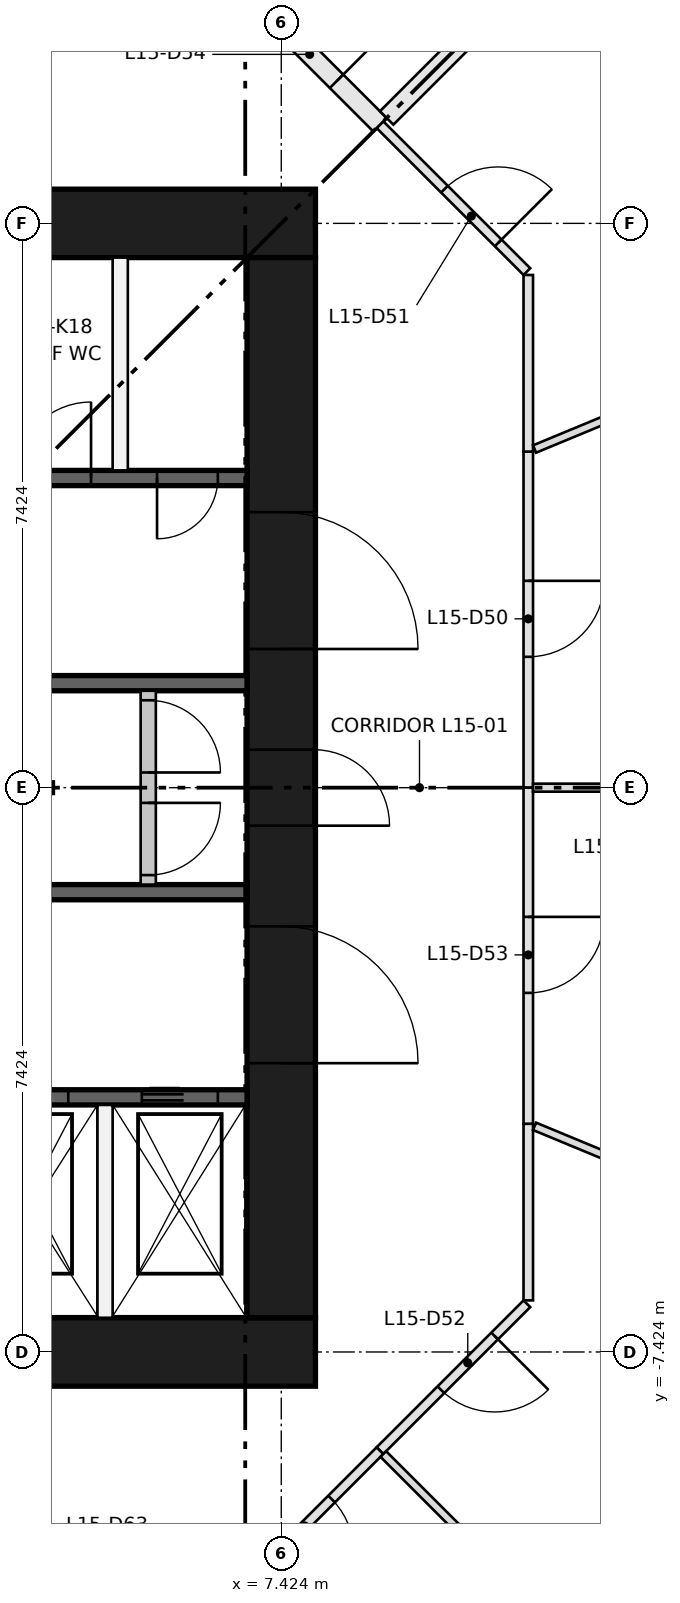
"""IFC4 building model, lengths in metres.
Left out: names, types, materials, properties, quantities, classifications, styles, units other than length and angle.
Written with IfcOpenShell. Run it as: python <this file> out.ifc"""

import sys

from ifc_helpers import new_model, si_unit, direction, frame, frame_2d, origin, place, context, subcontext, project, spatial, rectangle, extrude, element, fill, save


model = new_model("IFC4")
c1 = context("Model", 3, precision=1e-05, world=origin(), true_north=direction((0.0, 1.0)))
c2 = subcontext(c1, "Body", "Model", "MODEL_VIEW")
j1 = project(units=[si_unit("LENGTHUNIT", "METRE"), si_unit("PLANEANGLEUNIT", "RADIAN")], contexts=[c1])
p1 = place(None, origin())
s1 = spatial("IfcSite", under=j1, at=p1, CompositionType="ELEMENT")
p2 = place(p1, origin())
s2 = spatial("IfcBuilding", under=s1, at=p2, CompositionType="ELEMENT")
p3 = place(p2, frame((0.0, 0.0, 59.05)))
s3 = spatial("IfcBuildingStorey", under=s2, at=p3, CompositionType="ELEMENT", Elevation=59.05)
for number, where, z_axis, x_axis in (
    (1, (-7.874, -7.424, 0.0), (0.0, 0.0, 1.0), (1.0, 0.0, 0.0)),
    (2, (-7.874, 7.424, 0.0), (0.0, 0.0, 1.0), (1.0, 0.0, 0.0)),
):
    element("IfcWall", number, at=place(p3, frame(where, z_axis=z_axis, x_axis=x_axis)), inside=s3, PredefinedType="SHEAR", context=c2, shape_type="SweptSolid", body=[
        extrude(rectangle(XDim=15.748, YDim=0.9, at=frame_2d((7.874, 0.0))), origin(), (0.0, 0.0, 1.0), 3.65),
    ])
p4 = place(p3, frame((7.424, -6.974, 0.0), z_axis=(0.0, 0.0, 1.0), x_axis=(0.0, 1.0, 0.0)))
e3 = element("IfcWall", 3, at=p4, inside=s3, PredefinedType="SHEAR", context=c2, shape_type="SweptSolid", body=[
    extrude(rectangle(XDim=13.948, YDim=0.9, at=frame_2d((6.974, 0.0))), origin(), (0.0, 0.0, 1.0), 3.65),
])
p5 = place(p4, frame((6.474, 0.0, 0.0)))
e4 = element("IfcOpeningElement", 4, at=p5, cuts=e3, PredefinedType="OPENING", context=c2, shape_type="SweptSolid", body=[
    extrude(rectangle(XDim=1.0, YDim=2.1, at=frame_2d((0.5, 1.05))), frame((0.0, 0.46, 0.0), z_axis=(0.0, -1.0, 0.0), x_axis=(1.0, 0.0, 0.0)), (0.0, 0.0, 1.0), 0.92),
])
p6 = place(p4, frame((3.35, 0.0, 0.0)))
e5 = element("IfcOpeningElement", 5, at=p6, cuts=e3, PredefinedType="OPENING", context=c2, shape_type="SweptSolid", body=[
    extrude(rectangle(XDim=1.8, YDim=2.1, at=frame_2d((0.9, 1.05))), frame((0.0, 0.46, 0.0), z_axis=(0.0, -1.0, 0.0), x_axis=(1.0, 0.0, 0.0)), (0.0, 0.0, 1.0), 0.92),
])
p7 = place(p4, frame((8.799, 0.0, 0.0)))
e6 = element("IfcOpeningElement", 6, at=p7, cuts=e3, PredefinedType="OPENING", context=c2, shape_type="SweptSolid", body=[
    extrude(rectangle(XDim=1.8, YDim=2.1, at=frame_2d((0.9, 1.05))), frame((0.0, 0.46, 0.0), z_axis=(0.0, -1.0, 0.0), x_axis=(1.0, 0.0, 0.0)), (0.0, 0.0, 1.0), 0.92),
])
p8 = place(p3, frame((-6.974, -4.074, 0.0), z_axis=(0.0, 0.0, 1.0), x_axis=(1.0, 0.0, 0.0)))
e7 = element("IfcWall", 7, at=p8, inside=s3, PredefinedType="SHEAR", context=c2, shape_type="SweptSolid", body=[
    extrude(rectangle(XDim=13.948, YDim=0.2, at=frame_2d((6.974, 0.0))), origin(), (0.0, 0.0, 1.0), 3.3),
])
p9 = place(p8, frame((0.918, 0.0, 0.0)))
e8 = element("IfcOpeningElement", 8, at=p9, cuts=e7, PredefinedType="OPENING", context=c2, shape_type="SweptSolid", body=[
    extrude(rectangle(XDim=1.1, YDim=2.1, at=frame_2d((0.55, 1.05))), frame((0.0, 0.11, 0.0), z_axis=(0.0, -1.0, 0.0), x_axis=(1.0, 0.0, 0.0)), (0.0, 0.0, 1.0), 0.22),
])
p10 = place(p8, frame((4.055, 0.0, 0.0)))
e9 = element("IfcOpeningElement", 9, at=p10, cuts=e7, PredefinedType="OPENING", context=c2, shape_type="SweptSolid", body=[
    extrude(rectangle(XDim=1.1, YDim=2.1, at=frame_2d((0.55, 1.05))), frame((0.0, 0.11, 0.0), z_axis=(0.0, -1.0, 0.0), x_axis=(1.0, 0.0, 0.0)), (0.0, 0.0, 1.0), 0.22),
])
p11 = place(p8, frame((6.658, 0.0, 0.0)))
e10 = element("IfcOpeningElement", 10, at=p11, cuts=e7, PredefinedType="OPENING", context=c2, shape_type="SweptSolid", body=[
    extrude(rectangle(XDim=1.0, YDim=2.1, at=frame_2d((0.5, 1.05))), frame((0.0, 0.11, 0.0), z_axis=(0.0, -1.0, 0.0), x_axis=(1.0, 0.0, 0.0)), (0.0, 0.0, 1.0), 0.22),
])
p12 = place(p8, frame((8.627, 0.0, 0.0)))
e11 = element("IfcOpeningElement", 11, at=p12, cuts=e7, PredefinedType="OPENING", context=c2, shape_type="SweptSolid", body=[
    extrude(rectangle(XDim=1.0, YDim=2.1, at=frame_2d((0.5, 1.05))), frame((0.0, 0.11, 0.0), z_axis=(0.0, -1.0, 0.0), x_axis=(1.0, 0.0, 0.0)), (0.0, 0.0, 1.0), 0.22),
])
p13 = place(p8, frame((10.595, 0.0, 0.0)))
e12 = element("IfcOpeningElement", 12, at=p13, cuts=e7, PredefinedType="OPENING", context=c2, shape_type="SweptSolid", body=[
    extrude(rectangle(XDim=1.0, YDim=2.1, at=frame_2d((0.5, 1.05))), frame((0.0, 0.11, 0.0), z_axis=(0.0, -1.0, 0.0), x_axis=(1.0, 0.0, 0.0)), (0.0, 0.0, 1.0), 0.22),
])
p14 = place(p8, frame((12.564, 0.0, 0.0)))
e13 = element("IfcOpeningElement", 13, at=p14, cuts=e7, PredefinedType="OPENING", context=c2, shape_type="SweptSolid", body=[
    extrude(rectangle(XDim=1.0, YDim=2.1, at=frame_2d((0.5, 1.05))), frame((0.0, 0.11, 0.0), z_axis=(0.0, -1.0, 0.0), x_axis=(1.0, 0.0, 0.0)), (0.0, 0.0, 1.0), 0.22),
])
p15 = place(p3, frame((0.0, 4.074, 0.0), z_axis=(0.0, 0.0, 1.0), x_axis=(1.0, 0.0, 0.0)))
e14 = element("IfcWall", 14, at=p15, inside=s3, PredefinedType="SHEAR", context=c2, shape_type="SweptSolid", body=[
    extrude(rectangle(XDim=6.974, YDim=0.2, at=frame_2d((3.487, 0.0))), origin(), (0.0, 0.0, 1.0), 3.3),
])
p16 = place(p15, frame((0.179, 0.0, 0.0)))
e15 = element("IfcOpeningElement", 15, at=p16, cuts=e14, PredefinedType="OPENING", context=c2, shape_type="SweptSolid", body=[
    extrude(rectangle(XDim=0.95, YDim=2.1, at=frame_2d((0.475, 1.05))), frame((0.0, 0.11, 0.0), z_axis=(0.0, -1.0, 0.0), x_axis=(1.0, 0.0, 0.0)), (0.0, 0.0, 1.0), 0.22),
])
p17 = place(p15, frame((1.922, 0.0, 0.0)))
e16 = element("IfcOpeningElement", 16, at=p17, cuts=e14, PredefinedType="OPENING", context=c2, shape_type="SweptSolid", body=[
    extrude(rectangle(XDim=1.0, YDim=2.1, at=frame_2d((0.5, 1.05))), frame((0.0, 0.11, 0.0), z_axis=(0.0, -1.0, 0.0), x_axis=(1.0, 0.0, 0.0)), (0.0, 0.0, 1.0), 0.22),
])
p18 = place(p15, frame((3.921, 0.0, 0.0)))
e17 = element("IfcOpeningElement", 17, at=p18, cuts=e14, PredefinedType="OPENING", context=c2, shape_type="SweptSolid", body=[
    extrude(rectangle(XDim=1.0, YDim=2.1, at=frame_2d((0.5, 1.05))), frame((0.0, 0.11, 0.0), z_axis=(0.0, -1.0, 0.0), x_axis=(1.0, 0.0, 0.0)), (0.0, 0.0, 1.0), 0.22),
])
p19 = place(p15, frame((5.79, 0.0, 0.0)))
e18 = element("IfcOpeningElement", 18, at=p19, cuts=e14, PredefinedType="OPENING", context=c2, shape_type="SweptSolid", body=[
    extrude(rectangle(XDim=0.8, YDim=2.1, at=frame_2d((0.4, 1.05))), frame((0.0, 0.11, 0.0), z_axis=(0.0, -1.0, 0.0), x_axis=(1.0, 0.0, 0.0)), (0.0, 0.0, 1.0), 0.22),
])
for number, where, z_axis, x_axis in (
    (19, (4.374, -1.375, 0.0), (0.0, 0.0, 1.0), (1.0, 0.0, 0.0)),
    (20, (4.374, 1.375, 0.0), (0.0, 0.0, 1.0), (1.0, 0.0, 0.0)),
):
    element("IfcWall", number, at=place(p3, frame(where, z_axis=z_axis, x_axis=x_axis)), inside=s3, PredefinedType="SHEAR", context=c2, shape_type="SweptSolid", body=[
        extrude(rectangle(XDim=2.6, YDim=0.2, at=frame_2d((1.3, 0.0))), origin(), (0.0, 0.0, 1.0), 3.3),
    ])
for number, where, z_axis, x_axis in (
    (21, (5.105, -6.974, 0.0), (0.0, 0.0, 1.0), (0.0, 1.0, 0.0)),
    (22, (5.305, 4.174, 0.0), (0.0, 0.0, 1.0), (0.0, 1.0, 0.0)),
):
    element("IfcWall", number, at=place(p3, frame(where, z_axis=z_axis, x_axis=x_axis)), inside=s3, PredefinedType="PARTITIONING", context=c2, shape_type="SweptSolid", body=[
        extrude(rectangle(XDim=2.8, YDim=0.2, at=frame_2d((1.4, 0.0))), origin(), (0.0, 0.0, 1.0), 3.3),
    ])
p20 = place(p3, frame((5.674, -1.275, 0.0), z_axis=(0.0, 0.0, 1.0), x_axis=(0.0, 1.0, 0.0)))
e23 = element("IfcWall", 23, at=p20, inside=s3, PredefinedType="PARTITIONING", context=c2, shape_type="SweptSolid", body=[
    extrude(rectangle(XDim=2.55, YDim=0.2, at=frame_2d((1.275, 0.0))), origin(), (0.0, 0.0, 1.0), 3.3),
])
p21 = place(p20, frame((0.125, 0.0, 0.0)))
e24 = element("IfcOpeningElement", 24, at=p21, cuts=e23, PredefinedType="OPENING", context=c2, shape_type="SweptSolid", body=[
    extrude(rectangle(XDim=0.95, YDim=2.1, at=frame_2d((0.475, 1.05))), frame((0.0, 0.11, 0.0), z_axis=(0.0, -1.0, 0.0), x_axis=(1.0, 0.0, 0.0)), (0.0, 0.0, 1.0), 0.22),
])
p22 = place(p20, frame((1.475, 0.0, 0.0)))
e25 = element("IfcOpeningElement", 25, at=p22, cuts=e23, PredefinedType="OPENING", context=c2, shape_type="SweptSolid", body=[
    extrude(rectangle(XDim=0.95, YDim=2.1, at=frame_2d((0.475, 1.05))), frame((0.0, 0.11, 0.0), z_axis=(0.0, -1.0, 0.0), x_axis=(1.0, 0.0, 0.0)), (0.0, 0.0, 1.0), 0.22),
])
p23 = place(p3, frame((10.674, 4.421, 0.0), z_axis=(0.0, 0.0, 1.0), x_axis=(0.0, -1.0, 0.0)))
e26 = element("IfcWall", 26, at=p23, inside=s3, PredefinedType="PARTITIONING", context=c2, shape_type="SweptSolid", body=[
    extrude(rectangle(XDim=4.421, YDim=0.125, at=frame_2d((2.211, 0.0))), origin(), (0.0, 0.0, 1.0), 3.3),
])
p24 = place(p23, frame((1.7, 0.0, 0.0)))
e27 = element("IfcOpeningElement", 27, at=p24, cuts=e26, PredefinedType="OPENING", context=c2, shape_type="SweptSolid", body=[
    extrude(rectangle(XDim=1.0, YDim=2.1, at=frame_2d((0.5, 1.05))), frame((0.0, 0.073, 0.0), z_axis=(0.0, -1.0, 0.0), x_axis=(1.0, 0.0, 0.0)), (0.0, 0.0, 1.0), 0.145),
])
p25 = place(p3, frame((8.722, 8.722, 0.0), z_axis=(0.0, 0.0, 1.0), x_axis=(0.707151428813, -0.707062130741, 0.0)))
e28 = element("IfcWall", 28, at=p25, inside=s3, PredefinedType="PARTITIONING", context=c2, shape_type="SweptSolid", body=[
    extrude(rectangle(XDim=2.734, YDim=0.125, at=frame_2d((1.367, 0.0))), origin(), (0.0, 0.0, 1.0), 3.3),
])
p26 = place(p25, frame((1.2, 0.0, 0.0)))
e29 = element("IfcOpeningElement", 29, at=p26, cuts=e28, PredefinedType="OPENING", context=c2, shape_type="SweptSolid", body=[
    extrude(rectangle(XDim=1.0, YDim=2.1, at=frame_2d((0.5, 1.05))), frame((0.0, 0.073, 0.0), z_axis=(0.0, -1.0, 0.0), x_axis=(1.0, 0.0, 0.0)), (0.0, 0.0, 1.0), 0.145),
])
p27 = place(p3, frame((10.674, 6.745, 0.0), z_axis=(0.0, 0.0, 1.0), x_axis=(0.0, -1.0, 0.0)))
e30 = element("IfcWall", 30, at=p27, inside=s3, PredefinedType="PARTITIONING", context=c2, shape_type="SweptSolid", body=[
    extrude(rectangle(XDim=2.324, YDim=0.125, at=frame_2d((1.162, 0.0))), origin(), (0.0, 0.0, 1.0), 3.3),
])
p28 = place(p3, frame((10.656, -6.789, 0.0), z_axis=(0.0, 0.0, 1.0), x_axis=(-0.707151428813, -0.707062130741, 0.0)))
e31 = element("IfcWall", 31, at=p28, inside=s3, PredefinedType="PARTITIONING", context=c2, shape_type="SweptSolid", body=[
    extrude(rectangle(XDim=2.734, YDim=0.125, at=frame_2d((1.367, 0.0))), origin(), (0.0, 0.0, 1.0), 3.3),
])
p29 = place(p28, frame((0.6, 0.0, 0.0)))
e32 = element("IfcOpeningElement", 32, at=p29, cuts=e31, PredefinedType="OPENING", context=c2, shape_type="SweptSolid", body=[
    extrude(rectangle(XDim=1.0, YDim=2.1, at=frame_2d((0.5, 1.05))), frame((0.0, 0.073, 0.0), z_axis=(0.0, -1.0, 0.0), x_axis=(1.0, 0.0, 0.0)), (0.0, 0.0, 1.0), 0.145),
])
p30 = place(p3, frame((10.674, -4.421, 0.0), z_axis=(0.0, 0.0, 1.0), x_axis=(0.0, -1.0, 0.0)))
e33 = element("IfcWall", 33, at=p30, inside=s3, PredefinedType="PARTITIONING", context=c2, shape_type="SweptSolid", body=[
    extrude(rectangle(XDim=2.324, YDim=0.125, at=frame_2d((1.162, 0.0))), origin(), (0.0, 0.0, 1.0), 3.3),
])
p31 = place(p3, frame((10.674, 0.0, 0.0), z_axis=(0.0, 0.0, 1.0), x_axis=(0.0, -1.0, 0.0)))
e34 = element("IfcWall", 34, at=p31, inside=s3, PredefinedType="PARTITIONING", context=c2, shape_type="SweptSolid", body=[
    extrude(rectangle(XDim=4.421, YDim=0.125, at=frame_2d((2.211, 0.0))), origin(), (0.0, 0.0, 1.0), 3.3),
])
p32 = place(p31, frame((1.7, 0.0, 0.0)))
e35 = element("IfcOpeningElement", 35, at=p32, cuts=e34, PredefinedType="OPENING", context=c2, shape_type="SweptSolid", body=[
    extrude(rectangle(XDim=1.0, YDim=2.1, at=frame_2d((0.5, 1.05))), frame((0.0, 0.073, 0.0), z_axis=(0.0, -1.0, 0.0), x_axis=(1.0, 0.0, 0.0)), (0.0, 0.0, 1.0), 0.145),
])
p33 = place(p3, frame((6.808, 10.637, 0.0), z_axis=(0.0, 0.0, 1.0), x_axis=(0.707061703777, -0.707151855722, 0.0)))
e36 = element("IfcWall", 36, at=p33, inside=s3, PredefinedType="PARTITIONING", context=c2, shape_type="SweptSolid", body=[
    extrude(rectangle(XDim=2.708, YDim=0.25, at=frame_2d((1.354, 0.0))), origin(), (0.0, 0.0, 1.0), 3.3),
])
p34 = place(p33, frame((0.9, 0.0, 0.0)))
e37 = element("IfcOpeningElement", 37, at=p34, cuts=e36, PredefinedType="OPENING", context=c2, shape_type="SweptSolid", body=[
    extrude(rectangle(XDim=1.0, YDim=2.1, at=frame_2d((0.5, 1.05))), frame((0.0, 0.135, 0.0), z_axis=(0.0, -1.0, 0.0), x_axis=(1.0, 0.0, 0.0)), (0.0, 0.0, 1.0), 0.27),
])
p35 = place(p3, frame((8.722, -8.722, 0.0), z_axis=(0.0, 0.0, 1.0), x_axis=(-0.707062130741, -0.707151428813, 0.0)))
e38 = element("IfcWall", 38, at=p35, inside=s3, PredefinedType="PARTITIONING", context=c2, shape_type="SweptSolid", body=[
    extrude(rectangle(XDim=2.734, YDim=0.125, at=frame_2d((1.367, 0.0))), origin(), (0.0, 0.0, 1.0), 3.3),
])
p36 = place(p35, frame((0.9, 0.0, 0.0)))
e39 = element("IfcOpeningElement", 39, at=p36, cuts=e38, PredefinedType="OPENING", context=c2, shape_type="SweptSolid", body=[
    extrude(rectangle(XDim=1.0, YDim=2.1, at=frame_2d((0.5, 1.05))), frame((0.0, 0.073, 0.0), z_axis=(0.0, -1.0, 0.0), x_axis=(1.0, 0.0, 0.0)), (0.0, 0.0, 1.0), 0.145),
])
p37 = place(p3, frame((10.757, 4.456, 0.0), z_axis=(0.0, 0.0, 1.0), x_axis=(0.923886131731, 0.382667500051, 0.0)))
e40 = element("IfcWall", 40, at=p37, inside=s3, PredefinedType="PARTITIONING", context=c2, shape_type="SweptSolid", body=[
    extrude(rectangle(XDim=3.597, YDim=0.105, at=frame_2d((1.798, 0.0))), origin(), (0.0, 0.0, 1.0), 3.3),
])
p38 = place(p3, frame((15.185, 0.0, 0.0), z_axis=(0.0, 0.0, 1.0), x_axis=(-1.0, 0.0, 0.0)))
e41 = element("IfcWall", 41, at=p38, inside=s3, PredefinedType="PARTITIONING", context=c2, shape_type="SweptSolid", body=[
    extrude(rectangle(XDim=4.448, YDim=0.105, at=frame_2d((2.224, 0.0))), origin(), (0.0, 0.0, 1.0), 3.3),
])
p39 = place(p3, frame((12.947, 12.947, 0.0), z_axis=(0.0, 0.0, 1.0), x_axis=(-0.707106781187, -0.707106781187, 0.0)))
e42 = element("IfcWall", 42, at=p39, inside=s3, PredefinedType="PARTITIONING", context=c2, shape_type="SweptSolid", body=[
    extrude(rectangle(XDim=5.85, YDim=0.25, at=frame_2d((2.925, 0.0))), origin(), (0.0, 0.0, 1.0), 3.3),
])
p40 = place(p3, frame((8.767, -8.767, 0.0), z_axis=(0.0, 0.0, 1.0), x_axis=(0.707106781187, -0.707106781187, 0.0)))
e43 = element("IfcWall", 43, at=p40, inside=s3, PredefinedType="PARTITIONING", context=c2, shape_type="SweptSolid", body=[
    extrude(rectangle(XDim=5.912, YDim=0.105, at=frame_2d((2.956, 0.0))), origin(), (0.0, 0.0, 1.0), 3.3),
])
p41 = place(p3, frame((10.757, -4.456, 0.0), z_axis=(0.0, 0.0, 1.0), x_axis=(0.923886131731, -0.382667500051, 0.0)))
e44 = element("IfcWall", 44, at=p41, inside=s3, PredefinedType="PARTITIONING", context=c2, shape_type="SweptSolid", body=[
    extrude(rectangle(XDim=3.597, YDim=0.105, at=frame_2d((1.798, 0.0))), origin(), (0.0, 0.0, 1.0), 3.3),
])
p42 = place(p13, origin())
e45 = element("IfcDoor", 45, at=p42, inside=s3, OperationType="DOUBLE_DOOR_SLIDING", PredefinedType="DOOR", context=c2, shape_type="SweptSolid", body=[
    extrude(rectangle(XDim=1.0, YDim=2.1, at=frame_2d((0.5, 1.05))), frame((0.0, 0.025, 0.0), z_axis=(0.0, -1.0, 0.0), x_axis=(1.0, 0.0, 0.0)), (0.0, 0.0, 1.0), 0.05),
])
fill(e12, e45)
p43 = place(p14, origin())
e46 = element("IfcDoor", 46, at=p43, inside=s3, OperationType="DOUBLE_DOOR_SLIDING", PredefinedType="DOOR", context=c2, shape_type="SweptSolid", body=[
    extrude(rectangle(XDim=1.0, YDim=2.1, at=frame_2d((0.5, 1.05))), frame((0.0, 0.025, 0.0), z_axis=(0.0, -1.0, 0.0), x_axis=(1.0, 0.0, 0.0)), (0.0, 0.0, 1.0), 0.05),
])
fill(e13, e46)
p44 = place(p21, frame((0.95, 0.0, 0.0), z_axis=(0.0, 0.0, 1.0), x_axis=(-1.0, 0.0, 0.0)))
e47 = element("IfcDoor", 47, at=p44, inside=s3, OperationType="SINGLE_SWING_RIGHT", PredefinedType="DOOR", context=c2, shape_type="SweptSolid", body=[
    extrude(rectangle(XDim=0.95, YDim=2.1, at=frame_2d((0.475, 1.05))), frame((0.0, 0.025, 0.0), z_axis=(0.0, -1.0, 0.0), x_axis=(1.0, 0.0, 0.0)), (0.0, 0.0, 1.0), 0.05),
])
fill(e24, e47)
p45 = place(p22, frame((0.95, 0.0, 0.0), z_axis=(0.0, 0.0, 1.0), x_axis=(-1.0, 0.0, 0.0)))
e48 = element("IfcDoor", 48, at=p45, inside=s3, OperationType="SINGLE_SWING_LEFT", PredefinedType="DOOR", context=c2, shape_type="SweptSolid", body=[
    extrude(rectangle(XDim=0.95, YDim=2.1, at=frame_2d((0.475, 1.05))), frame((0.0, 0.025, 0.0), z_axis=(0.0, -1.0, 0.0), x_axis=(1.0, 0.0, 0.0)), (0.0, 0.0, 1.0), 0.05),
])
fill(e25, e48)
p46 = place(p18, origin())
e49 = element("IfcDoor", 49, at=p46, inside=s3, OperationType="SINGLE_SWING_RIGHT", PredefinedType="DOOR", context=c2, shape_type="SweptSolid", body=[
    extrude(rectangle(XDim=1.0, YDim=2.1, at=frame_2d((0.5, 1.05))), frame((0.0, 0.025, 0.0), z_axis=(0.0, -1.0, 0.0), x_axis=(1.0, 0.0, 0.0)), (0.0, 0.0, 1.0), 0.05),
])
fill(e17, e49)
p47 = place(p19, frame((0.8, 0.0, 0.0), z_axis=(0.0, 0.0, 1.0), x_axis=(-1.0, 0.0, 0.0)))
e50 = element("IfcDoor", 50, at=p47, inside=s3, OperationType="SINGLE_SWING_LEFT", PredefinedType="DOOR", context=c2, shape_type="SweptSolid", body=[
    extrude(rectangle(XDim=0.8, YDim=2.1, at=frame_2d((0.4, 1.05))), frame((0.0, 0.025, 0.0), z_axis=(0.0, -1.0, 0.0), x_axis=(1.0, 0.0, 0.0)), (0.0, 0.0, 1.0), 0.05),
])
fill(e18, e50)
p48 = place(p5, frame((1.0, 0.0, 0.0), z_axis=(0.0, 0.0, 1.0), x_axis=(-1.0, 0.0, 0.0)))
e51 = element("IfcDoor", 51, at=p48, inside=s3, OperationType="SINGLE_SWING_LEFT", PredefinedType="DOOR", context=c2, shape_type="SweptSolid", body=[
    extrude(rectangle(XDim=1.0, YDim=2.1, at=frame_2d((0.5, 1.05))), frame((0.0, 0.45, 0.0), z_axis=(0.0, -1.0, 0.0), x_axis=(1.0, 0.0, 0.0)), (0.0, 0.0, 1.0), 0.05),
])
fill(e4, e51)
p49 = place(p6, frame((1.8, 0.0, 0.0), z_axis=(0.0, 0.0, 1.0), x_axis=(-1.0, 0.0, 0.0)))
e52 = element("IfcDoor", 52, at=p49, inside=s3, OperationType="DOUBLE_DOOR_SINGLE_SWING", PredefinedType="DOOR", context=c2, shape_type="SweptSolid", body=[
    extrude(rectangle(XDim=1.8, YDim=2.1, at=frame_2d((0.9, 1.05))), frame((0.0, 0.025, 0.0), z_axis=(0.0, -1.0, 0.0), x_axis=(1.0, 0.0, 0.0)), (0.0, 0.0, 1.0), 0.05),
])
fill(e5, e52)
p50 = place(p7, frame((1.8, 0.0, 0.0), z_axis=(0.0, 0.0, 1.0), x_axis=(-1.0, 0.0, 0.0)))
e53 = element("IfcDoor", 53, at=p50, inside=s3, OperationType="DOUBLE_DOOR_SINGLE_SWING", PredefinedType="DOOR", context=c2, shape_type="SweptSolid", body=[
    extrude(rectangle(XDim=1.8, YDim=2.1, at=frame_2d((0.9, 1.05))), frame((0.0, 0.025, 0.0), z_axis=(0.0, -1.0, 0.0), x_axis=(1.0, 0.0, 0.0)), (0.0, 0.0, 1.0), 0.05),
])
fill(e6, e53)
p51 = place(p24, origin())
e54 = element("IfcDoor", 54, at=p51, inside=s3, OperationType="SINGLE_SWING_LEFT", PredefinedType="DOOR", context=c2, shape_type="SweptSolid", body=[
    extrude(rectangle(XDim=1.0, YDim=2.1, at=frame_2d((0.5, 1.05))), frame((0.0, 0.025, 0.0), z_axis=(0.0, -1.0, 0.0), x_axis=(1.0, 0.0, 0.0)), (0.0, 0.0, 1.0), 0.05),
])
fill(e27, e54)
p52 = place(p26, origin())
e55 = element("IfcDoor", 55, at=p52, inside=s3, OperationType="SINGLE_SWING_RIGHT", PredefinedType="DOOR", context=c2, shape_type="SweptSolid", body=[
    extrude(rectangle(XDim=1.0, YDim=2.1, at=frame_2d((0.5, 1.05))), frame((0.0, 0.025, 0.0), z_axis=(0.0, -1.0, 0.0), x_axis=(1.0, 0.0, 0.0)), (0.0, 0.0, 1.0), 0.05),
])
fill(e29, e55)
p53 = place(p29, origin())
e56 = element("IfcDoor", 56, at=p53, inside=s3, OperationType="SINGLE_SWING_LEFT", PredefinedType="DOOR", context=c2, shape_type="SweptSolid", body=[
    extrude(rectangle(XDim=1.0, YDim=2.1, at=frame_2d((0.5, 1.05))), frame((0.0, 0.025, 0.0), z_axis=(0.0, -1.0, 0.0), x_axis=(1.0, 0.0, 0.0)), (0.0, 0.0, 1.0), 0.05),
])
fill(e32, e56)
p54 = place(p32, origin())
e57 = element("IfcDoor", 57, at=p54, inside=s3, OperationType="SINGLE_SWING_LEFT", PredefinedType="DOOR", context=c2, shape_type="SweptSolid", body=[
    extrude(rectangle(XDim=1.0, YDim=2.1, at=frame_2d((0.5, 1.05))), frame((0.0, 0.025, 0.0), z_axis=(0.0, -1.0, 0.0), x_axis=(1.0, 0.0, 0.0)), (0.0, 0.0, 1.0), 0.05),
])
fill(e35, e57)
p55 = place(p34, origin())
e58 = element("IfcDoor", 58, at=p55, inside=s3, OperationType="SINGLE_SWING_RIGHT", PredefinedType="DOOR", context=c2, shape_type="SweptSolid", body=[
    extrude(rectangle(XDim=1.0, YDim=2.1, at=frame_2d((0.5, 1.05))), frame((0.0, 0.025, 0.0), z_axis=(0.0, -1.0, 0.0), x_axis=(1.0, 0.0, 0.0)), (0.0, 0.0, 1.0), 0.05),
])
fill(e37, e58)
p56 = place(p36, origin())
e59 = element("IfcDoor", 59, at=p56, inside=s3, OperationType="SINGLE_SWING_RIGHT", PredefinedType="DOOR", context=c2, shape_type="SweptSolid", body=[
    extrude(rectangle(XDim=1.0, YDim=2.1, at=frame_2d((0.5, 1.05))), frame((0.0, 0.025, 0.0), z_axis=(0.0, -1.0, 0.0), x_axis=(1.0, 0.0, 0.0)), (0.0, 0.0, 1.0), 0.05),
])
fill(e39, e59)
save(model, sys.argv[1])
